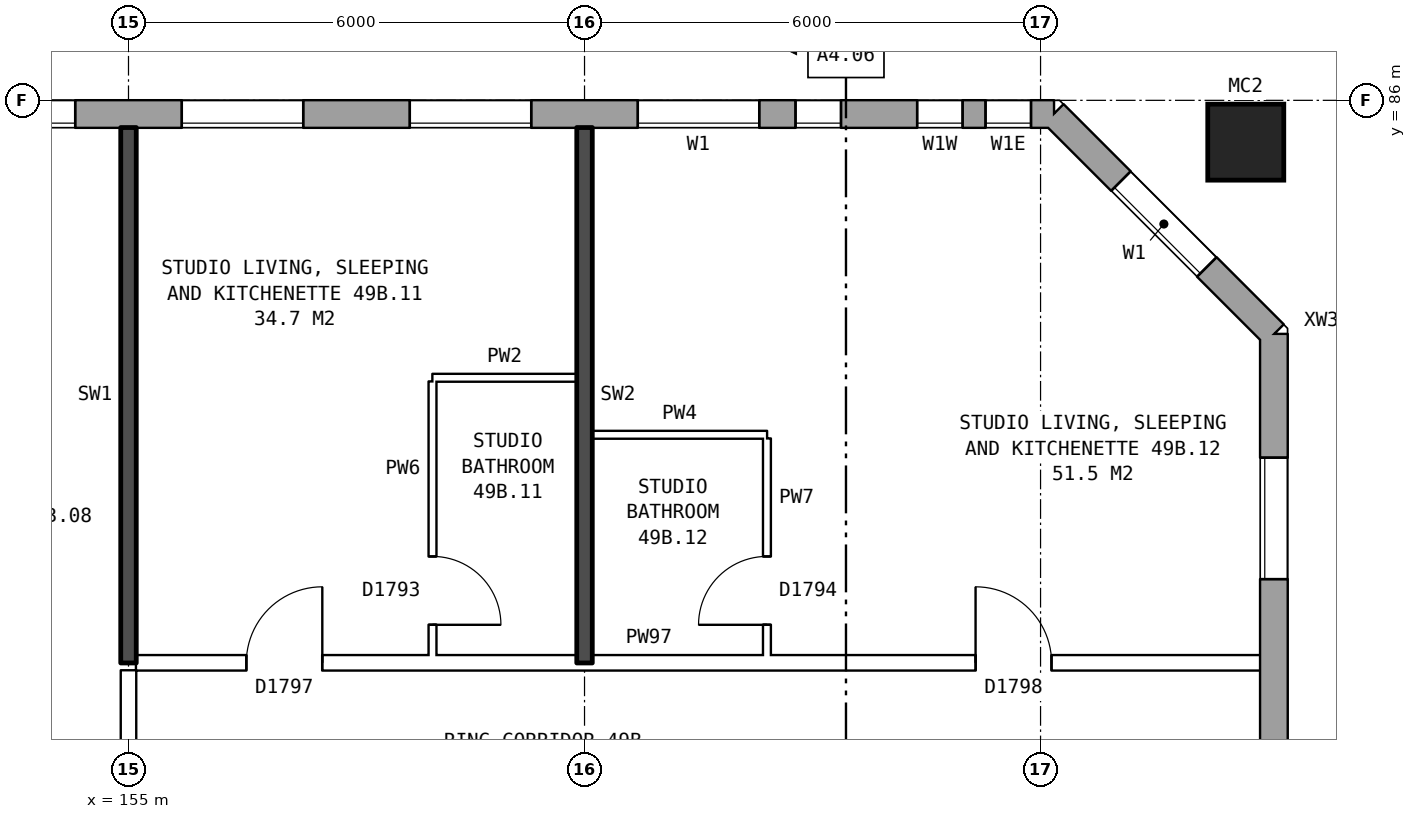
"""IFC4 building model, lengths in metres.
Left out: names, types, materials, properties, quantities, classifications, styles, units other than length and angle.
Written with IfcOpenShell. Run it as: python <this file> out.ifc"""

import sys

from ifc_helpers import new_model, si_unit, direction, frame, frame_2d, origin, origin_2d, place, context, subcontext, project, spatial, rectangle, hollow_rectangle, extrude, element, fill, save


model = new_model("IFC4")
c1 = context("Model", 3, precision=1e-05, world=origin(), true_north=direction((0.0, 1.0)))
c2 = subcontext(c1, "Body", "Model", "MODEL_VIEW")
j1 = project(units=[si_unit("LENGTHUNIT", "METRE"), si_unit("PLANEANGLEUNIT", "RADIAN")], contexts=[c1])
p1 = place(None, origin())
s1 = spatial("IfcSite", under=j1, at=p1, CompositionType="ELEMENT")
p2 = place(p1, origin())
s2 = spatial("IfcBuilding", under=s1, at=p2, CompositionType="ELEMENT")
p3 = place(p2, frame((0.0, 0.0, 175.8)))
s3 = spatial("IfcBuildingStorey", under=s2, at=p3, CompositionType="ELEMENT", Elevation=175.8)
p4 = place(p3, frame((169.7, 85.45, 0.0), z_axis=(0.0, 0.0, 1.0), x_axis=(1.0, 0.0, 0.0)))
e1 = element("IfcColumn", 1, at=p4, inside=s3, PredefinedType="COLUMN", context=c2, shape_type="SweptSolid", body=[
    extrude(hollow_rectangle(XDim=1.0, YDim=1.0, WallThickness=0.055, at=origin_2d()), origin(), (0.0, 0.0, 1.0), 3.1),
])
p5 = place(p3, frame((170.07, 57.075, 0.0), z_axis=(0.0, 0.0, 1.0), x_axis=(0.0, 1.0, 0.0)))
e2 = element("IfcWall", 2, at=p5, inside=s3, PredefinedType="STANDARD", context=c2, shape_type="SweptSolid", body=[
    extrude(rectangle(XDim=25.851, YDim=0.36, at=frame_2d((12.925, 0.0))), origin(), (0.0, 0.0, 1.0), 2.85),
])
p6 = place(p5, frame((1.625, 0.0, 0.8)))
e3 = element("IfcOpeningElement", 3, at=p6, cuts=e2, PredefinedType="OPENING", context=c2, shape_type="SweptSolid", body=[
    extrude(rectangle(XDim=1.6, YDim=1.8, at=frame_2d((0.8, 0.9))), frame((0.0, 0.19, 0.0), z_axis=(0.0, -1.0, 0.0), x_axis=(1.0, 0.0, 0.0)), (0.0, 0.0, 1.0), 0.38),
])
p7 = place(p5, frame((5.725, 0.0, 0.8)))
e4 = element("IfcOpeningElement", 4, at=p7, cuts=e2, PredefinedType="OPENING", context=c2, shape_type="SweptSolid", body=[
    extrude(rectangle(XDim=1.6, YDim=0.9, at=frame_2d((0.8, 0.45))), frame((0.0, 0.19, 0.0), z_axis=(0.0, -1.0, 0.0), x_axis=(1.0, 0.0, 0.0)), (0.0, 0.0, 1.0), 0.38),
])
p8 = place(p5, frame((7.625, 0.0, 0.8)))
e5 = element("IfcOpeningElement", 5, at=p8, cuts=e2, PredefinedType="OPENING", context=c2, shape_type="SweptSolid", body=[
    extrude(rectangle(XDim=1.6, YDim=1.8, at=frame_2d((0.8, 0.9))), frame((0.0, 0.19, 0.0), z_axis=(0.0, -1.0, 0.0), x_axis=(1.0, 0.0, 0.0)), (0.0, 0.0, 1.0), 0.38),
])
p9 = place(p5, frame((10.625, 0.0, 0.8)))
e6 = element("IfcOpeningElement", 6, at=p9, cuts=e2, PredefinedType="OPENING", context=c2, shape_type="SweptSolid", body=[
    extrude(rectangle(XDim=1.6, YDim=1.8, at=frame_2d((0.8, 0.9))), frame((0.0, 0.19, 0.0), z_axis=(0.0, -1.0, 0.0), x_axis=(1.0, 0.0, 0.0)), (0.0, 0.0, 1.0), 0.38),
])
p10 = place(p5, frame((13.625, 0.0, 0.8)))
e7 = element("IfcOpeningElement", 7, at=p10, cuts=e2, PredefinedType="OPENING", context=c2, shape_type="SweptSolid", body=[
    extrude(rectangle(XDim=1.6, YDim=1.8, at=frame_2d((0.8, 0.9))), frame((0.0, 0.19, 0.0), z_axis=(0.0, -1.0, 0.0), x_axis=(1.0, 0.0, 0.0)), (0.0, 0.0, 1.0), 0.38),
])
p11 = place(p5, frame((16.625, 0.0, 0.8)))
e8 = element("IfcOpeningElement", 8, at=p11, cuts=e2, PredefinedType="OPENING", context=c2, shape_type="SweptSolid", body=[
    extrude(rectangle(XDim=1.6, YDim=1.8, at=frame_2d((0.8, 0.9))), frame((0.0, 0.19, 0.0), z_axis=(0.0, -1.0, 0.0), x_axis=(1.0, 0.0, 0.0)), (0.0, 0.0, 1.0), 0.38),
])
p12 = place(p5, frame((9.525, 0.0, 0.8)))
e9 = element("IfcOpeningElement", 9, at=p12, cuts=e2, PredefinedType="OPENING", context=c2, shape_type="SweptSolid", body=[
    extrude(rectangle(XDim=0.8, YDim=1.8, at=frame_2d((0.4, 0.9))), frame((0.0, 0.19, 0.0), z_axis=(0.0, -1.0, 0.0), x_axis=(1.0, 0.0, 0.0)), (0.0, 0.0, 1.0), 0.38),
])
p13 = place(p5, frame((22.625, 0.0, 0.8)))
e10 = element("IfcOpeningElement", 10, at=p13, cuts=e2, PredefinedType="OPENING", context=c2, shape_type="SweptSolid", body=[
    extrude(rectangle(XDim=1.6, YDim=1.8, at=frame_2d((0.8, 0.9))), frame((0.0, 0.19, 0.0), z_axis=(0.0, -1.0, 0.0), x_axis=(1.0, 0.0, 0.0)), (0.0, 0.0, 1.0), 0.38),
])
p14 = place(p5, frame((12.525, 0.0, 0.8)))
e11 = element("IfcOpeningElement", 11, at=p14, cuts=e2, PredefinedType="OPENING", context=c2, shape_type="SweptSolid", body=[
    extrude(rectangle(XDim=0.8, YDim=1.8, at=frame_2d((0.4, 0.9))), frame((0.0, 0.19, 0.0), z_axis=(0.0, -1.0, 0.0), x_axis=(1.0, 0.0, 0.0)), (0.0, 0.0, 1.0), 0.38),
])
p15 = place(p5, frame((15.525, 0.0, 0.8)))
e12 = element("IfcOpeningElement", 12, at=p15, cuts=e2, PredefinedType="OPENING", context=c2, shape_type="SweptSolid", body=[
    extrude(rectangle(XDim=0.8, YDim=1.8, at=frame_2d((0.4, 0.9))), frame((0.0, 0.19, 0.0), z_axis=(0.0, -1.0, 0.0), x_axis=(1.0, 0.0, 0.0)), (0.0, 0.0, 1.0), 0.38),
])
p16 = place(p5, frame((18.525, 0.0, 0.8)))
e13 = element("IfcOpeningElement", 13, at=p16, cuts=e2, PredefinedType="OPENING", context=c2, shape_type="SweptSolid", body=[
    extrude(rectangle(XDim=1.6, YDim=0.9, at=frame_2d((0.8, 0.45))), frame((0.0, 0.19, 0.0), z_axis=(0.0, -1.0, 0.0), x_axis=(1.0, 0.0, 0.0)), (0.0, 0.0, 1.0), 0.38),
])
p17 = place(p3, frame((170.07, 82.925, 0.0), z_axis=(0.0, 0.0, 1.0), x_axis=(-0.707106781187, 0.707106781187, 0.0)))
e14 = element("IfcWall", 14, at=p17, inside=s3, PredefinedType="STANDARD", context=c2, shape_type="SweptSolid", body=[
    extrude(rectangle(XDim=4.094, YDim=0.36, at=frame_2d((2.047, 0.0))), origin(), (0.0, 0.0, 1.0), 2.85),
])
p18 = place(p17, frame((1.247, 0.0, 0.8)))
e15 = element("IfcOpeningElement", 15, at=p18, cuts=e14, PredefinedType="OPENING", context=c2, shape_type="SweptSolid", body=[
    extrude(rectangle(XDim=1.6, YDim=1.8, at=frame_2d((0.8, 0.9))), frame((0.0, 0.19, 0.0), z_axis=(0.0, -1.0, 0.0), x_axis=(1.0, 0.0, 0.0)), (0.0, 0.0, 1.0), 0.38),
])
p19 = place(p3, frame((167.175, 85.82, 0.0), z_axis=(0.0, 0.0, 1.0), x_axis=(-1.0, 0.0, 0.0)))
e16 = element("IfcWall", 16, at=p19, inside=s3, PredefinedType="STANDARD", context=c2, shape_type="SweptSolid", body=[
    extrude(rectangle(XDim=33.101, YDim=0.36, at=frame_2d((16.55, 0.0))), origin(), (0.0, 0.0, 1.0), 2.85),
])
p20 = place(p19, frame((0.3, 0.0, 0.8)))
e17 = element("IfcOpeningElement", 17, at=p20, cuts=e16, PredefinedType="OPENING", context=c2, shape_type="SweptSolid", body=[
    extrude(rectangle(XDim=0.6, YDim=1.8, at=frame_2d((0.3, 0.9))), frame((0.0, 0.19, 0.0), z_axis=(0.0, -1.0, 0.0), x_axis=(1.0, 0.0, 0.0)), (0.0, 0.0, 1.0), 0.38),
])
p21 = place(p19, frame((3.875, 0.0, 0.8)))
e18 = element("IfcOpeningElement", 18, at=p21, cuts=e16, PredefinedType="OPENING", context=c2, shape_type="SweptSolid", body=[
    extrude(rectangle(XDim=1.6, YDim=1.8, at=frame_2d((0.8, 0.9))), frame((0.0, 0.19, 0.0), z_axis=(0.0, -1.0, 0.0), x_axis=(1.0, 0.0, 0.0)), (0.0, 0.0, 1.0), 0.38),
])
p22 = place(p19, frame((6.875, 0.0, 0.8)))
e19 = element("IfcOpeningElement", 19, at=p22, cuts=e16, PredefinedType="OPENING", context=c2, shape_type="SweptSolid", body=[
    extrude(rectangle(XDim=1.6, YDim=1.8, at=frame_2d((0.8, 0.9))), frame((0.0, 0.19, 0.0), z_axis=(0.0, -1.0, 0.0), x_axis=(1.0, 0.0, 0.0)), (0.0, 0.0, 1.0), 0.38),
])
p23 = place(p19, frame((9.875, 0.0, 0.8)))
e20 = element("IfcOpeningElement", 20, at=p23, cuts=e16, PredefinedType="OPENING", context=c2, shape_type="SweptSolid", body=[
    extrude(rectangle(XDim=1.6, YDim=1.8, at=frame_2d((0.8, 0.9))), frame((0.0, 0.19, 0.0), z_axis=(0.0, -1.0, 0.0), x_axis=(1.0, 0.0, 0.0)), (0.0, 0.0, 1.0), 0.38),
])
p24 = place(p19, frame((12.875, 0.0, 0.8)))
e21 = element("IfcOpeningElement", 21, at=p24, cuts=e16, PredefinedType="OPENING", context=c2, shape_type="SweptSolid", body=[
    extrude(rectangle(XDim=1.6, YDim=1.8, at=frame_2d((0.8, 0.9))), frame((0.0, 0.19, 0.0), z_axis=(0.0, -1.0, 0.0), x_axis=(1.0, 0.0, 0.0)), (0.0, 0.0, 1.0), 0.38),
])
p25 = place(p19, frame((15.875, 0.0, 0.8)))
e22 = element("IfcOpeningElement", 22, at=p25, cuts=e16, PredefinedType="OPENING", context=c2, shape_type="SweptSolid", body=[
    extrude(rectangle(XDim=1.6, YDim=1.8, at=frame_2d((0.8, 0.9))), frame((0.0, 0.19, 0.0), z_axis=(0.0, -1.0, 0.0), x_axis=(1.0, 0.0, 0.0)), (0.0, 0.0, 1.0), 0.38),
])
p26 = place(p19, frame((18.875, 0.0, 0.8)))
e23 = element("IfcOpeningElement", 23, at=p26, cuts=e16, PredefinedType="OPENING", context=c2, shape_type="SweptSolid", body=[
    extrude(rectangle(XDim=1.6, YDim=1.8, at=frame_2d((0.8, 0.9))), frame((0.0, 0.19, 0.0), z_axis=(0.0, -1.0, 0.0), x_axis=(1.0, 0.0, 0.0)), (0.0, 0.0, 1.0), 0.38),
])
p27 = place(p19, frame((21.875, 0.0, 0.8)))
e24 = element("IfcOpeningElement", 24, at=p27, cuts=e16, PredefinedType="OPENING", context=c2, shape_type="SweptSolid", body=[
    extrude(rectangle(XDim=1.6, YDim=1.8, at=frame_2d((0.8, 0.9))), frame((0.0, 0.19, 0.0), z_axis=(0.0, -1.0, 0.0), x_axis=(1.0, 0.0, 0.0)), (0.0, 0.0, 1.0), 0.38),
])
p28 = place(p19, frame((24.875, 0.0, 0.8)))
e25 = element("IfcOpeningElement", 25, at=p28, cuts=e16, PredefinedType="OPENING", context=c2, shape_type="SweptSolid", body=[
    extrude(rectangle(XDim=1.6, YDim=1.8, at=frame_2d((0.8, 0.9))), frame((0.0, 0.19, 0.0), z_axis=(0.0, -1.0, 0.0), x_axis=(1.0, 0.0, 0.0)), (0.0, 0.0, 1.0), 0.38),
])
p29 = place(p19, frame((27.875, 0.0, 0.8)))
e26 = element("IfcOpeningElement", 26, at=p29, cuts=e16, PredefinedType="OPENING", context=c2, shape_type="SweptSolid", body=[
    extrude(rectangle(XDim=1.6, YDim=1.8, at=frame_2d((0.8, 0.9))), frame((0.0, 0.19, 0.0), z_axis=(0.0, -1.0, 0.0), x_axis=(1.0, 0.0, 0.0)), (0.0, 0.0, 1.0), 0.38),
])
p30 = place(p19, frame((31.575, 0.0, 1.4)))
e27 = element("IfcOpeningElement", 27, at=p30, cuts=e16, PredefinedType="OPENING", context=c2, shape_type="SweptSolid", body=[
    extrude(rectangle(XDim=1.2, YDim=1.2, at=frame_2d((0.6, 0.6))), frame((0.0, 0.19, 0.0), z_axis=(0.0, -1.0, 0.0), x_axis=(1.0, 0.0, 0.0)), (0.0, 0.0, 1.0), 0.38),
])
p31 = place(p19, frame((1.2, 0.0, 1.7)))
e28 = element("IfcOpeningElement", 28, at=p31, cuts=e16, PredefinedType="OPENING", context=c2, shape_type="SweptSolid", body=[
    extrude(rectangle(XDim=0.6, YDim=0.9, at=frame_2d((0.3, 0.45))), frame((0.0, 0.19, 0.0), z_axis=(0.0, -1.0, 0.0), x_axis=(1.0, 0.0, 0.0)), (0.0, 0.0, 1.0), 0.38),
])
p32 = place(p19, frame((2.8, 0.0, 0.8)))
e29 = element("IfcOpeningElement", 29, at=p32, cuts=e16, PredefinedType="OPENING", context=c2, shape_type="SweptSolid", body=[
    extrude(rectangle(XDim=0.6, YDim=0.9, at=frame_2d((0.3, 0.45))), frame((0.0, 0.19, 0.0), z_axis=(0.0, -1.0, 0.0), x_axis=(1.0, 0.0, 0.0)), (0.0, 0.0, 1.0), 0.38),
])
p33 = place(p3, frame((155.1, 78.6, 0.0), z_axis=(0.0, 0.0, 1.0), x_axis=(1.0, 0.0, 0.0)))
e30 = element("IfcWall", 30, at=p33, inside=s3, PredefinedType="PARTITIONING", context=c2, shape_type="SweptSolid", body=[
    extrude(rectangle(XDim=14.79, YDim=0.2, at=frame_2d((7.395, 0.0))), origin(), (0.0, 0.0, 1.0), 2.85),
])
p34 = place(p33, frame((1.45, 0.0, 0.0)))
e31 = element("IfcOpeningElement", 31, at=p34, cuts=e30, PredefinedType="OPENING", context=c2, shape_type="SweptSolid", body=[
    extrude(rectangle(XDim=1.0, YDim=2.1, at=frame_2d((0.5, 1.05))), frame((0.0, 0.11, 0.0), z_axis=(0.0, -1.0, 0.0), x_axis=(1.0, 0.0, 0.0)), (0.0, 0.0, 1.0), 0.22),
])
p35 = place(p33, frame((11.045, 0.0, 0.0)))
e32 = element("IfcOpeningElement", 32, at=p35, cuts=e30, PredefinedType="OPENING", context=c2, shape_type="SweptSolid", body=[
    extrude(rectangle(XDim=1.0, YDim=2.1, at=frame_2d((0.5, 1.05))), frame((0.0, 0.11, 0.0), z_axis=(0.0, -1.0, 0.0), x_axis=(1.0, 0.0, 0.0)), (0.0, 0.0, 1.0), 0.22),
])
p36 = place(p3, frame((161.1, 81.6, 0.0), z_axis=(0.0, 0.0, 1.0), x_axis=(1.0, 0.0, 0.0)))
e33 = element("IfcWall", 33, at=p36, inside=s3, PredefinedType="PARTITIONING", context=c2, shape_type="SweptSolid", body=[
    extrude(rectangle(XDim=2.3, YDim=0.1, at=frame_2d((1.15, 0.0))), origin(), (0.0, 0.0, 1.0), 2.85),
])
p37 = place(p3, frame((159.0, 82.35, 0.0), z_axis=(0.0, 0.0, 1.0), x_axis=(1.0, 0.0, 0.0)))
e34 = element("IfcWall", 34, at=p37, inside=s3, PredefinedType="PARTITIONING", context=c2, shape_type="SweptSolid", body=[
    extrude(rectangle(XDim=1.9, YDim=0.1, at=frame_2d((0.95, 0.0))), origin(), (0.0, 0.0, 1.0), 2.85),
])
p38 = place(p3, frame((155.0, 76.3, 0.0), z_axis=(0.0, 0.0, 1.0), x_axis=(0.0, 1.0, 0.0)))
e35 = element("IfcWall", 35, at=p38, inside=s3, PredefinedType="PARTITIONING", context=c2, shape_type="SweptSolid", body=[
    extrude(rectangle(XDim=2.2, YDim=0.2, at=frame_2d((1.1, 0.0))), origin(), (0.0, 0.0, 1.0), 2.85),
])
p39 = place(p3, frame((155.0, 78.6, 0.0), z_axis=(0.0, 0.0, 1.0), x_axis=(0.0, 1.0, 0.0)))
e36 = element("IfcWall", 36, at=p39, inside=s3, PredefinedType="SOLIDWALL", context=c2, shape_type="SweptSolid", body=[
    extrude(rectangle(XDim=7.04, YDim=0.2, at=frame_2d((3.52, 0.0))), origin(), (0.0, 0.0, 1.0), 2.85),
])
p40 = place(p3, frame((159.0, 78.7, 0.0), z_axis=(0.0, 0.0, 1.0), x_axis=(0.0, 1.0, 0.0)))
e37 = element("IfcWall", 37, at=p40, inside=s3, PredefinedType="PARTITIONING", context=c2, shape_type="SweptSolid", body=[
    extrude(rectangle(XDim=3.6, YDim=0.1, at=frame_2d((1.8, 0.0))), origin(), (0.0, 0.0, 1.0), 2.85),
])
p41 = place(p40, frame((0.4, 0.0, 0.0)))
e38 = element("IfcOpeningElement", 38, at=p41, cuts=e37, PredefinedType="OPENING", context=c2, shape_type="SweptSolid", body=[
    extrude(rectangle(XDim=0.9, YDim=2.1, at=frame_2d((0.45, 1.05))), frame((0.0, 0.06, 0.0), z_axis=(0.0, -1.0, 0.0), x_axis=(1.0, 0.0, 0.0)), (0.0, 0.0, 1.0), 0.12),
])
p42 = place(p3, frame((161.0, 78.6, 0.0), z_axis=(0.0, 0.0, 1.0), x_axis=(0.0, 1.0, 0.0)))
e39 = element("IfcWall", 39, at=p42, inside=s3, PredefinedType="SOLIDWALL", context=c2, shape_type="SweptSolid", body=[
    extrude(rectangle(XDim=7.04, YDim=0.2, at=frame_2d((3.52, 0.0))), origin(), (0.0, 0.0, 1.0), 2.85),
])
p43 = place(p3, frame((163.4, 78.7, 0.0), z_axis=(0.0, 0.0, 1.0), x_axis=(0.0, 1.0, 0.0)))
e40 = element("IfcWall", 40, at=p43, inside=s3, PredefinedType="PARTITIONING", context=c2, shape_type="SweptSolid", body=[
    extrude(rectangle(XDim=2.85, YDim=0.1, at=frame_2d((1.425, 0.0))), origin(), (0.0, 0.0, 1.0), 2.85),
])
p44 = place(p43, frame((0.4, 0.0, 0.0)))
e41 = element("IfcOpeningElement", 41, at=p44, cuts=e40, PredefinedType="OPENING", context=c2, shape_type="SweptSolid", body=[
    extrude(rectangle(XDim=0.9, YDim=2.1, at=frame_2d((0.45, 1.05))), frame((0.0, 0.06, 0.0), z_axis=(0.0, -1.0, 0.0), x_axis=(1.0, 0.0, 0.0)), (0.0, 0.0, 1.0), 0.12),
])
p45 = place(p13, origin())
e42 = element("IfcWindow", 42, at=p45, inside=s3, PartitioningType="SINGLE_PANEL", PredefinedType="WINDOW", context=c2, shape_type="SweptSolid", body=[
    extrude(rectangle(XDim=1.6, YDim=1.8, at=frame_2d((0.8, 0.9))), frame((0.0, 0.15, 0.0), z_axis=(0.0, -1.0, 0.0), x_axis=(1.0, 0.0, 0.0)), (0.0, 0.0, 1.0), 0.06),
])
fill(e10, e42)
p46 = place(p18, origin())
e43 = element("IfcWindow", 43, at=p46, inside=s3, PartitioningType="SINGLE_PANEL", PredefinedType="WINDOW", context=c2, shape_type="SweptSolid", body=[
    extrude(rectangle(XDim=1.6, YDim=1.8, at=frame_2d((0.8, 0.9))), frame((0.0, 0.15, 0.0), z_axis=(0.0, -1.0, 0.0), x_axis=(1.0, 0.0, 0.0)), (0.0, 0.0, 1.0), 0.06),
])
fill(e15, e43)
p47 = place(p20, origin())
e44 = element("IfcWindow", 44, at=p47, inside=s3, PartitioningType="SINGLE_PANEL", PredefinedType="WINDOW", context=c2, shape_type="SweptSolid", body=[
    extrude(rectangle(XDim=0.6, YDim=1.8, at=frame_2d((0.3, 0.9))), frame((0.0, 0.15, 0.0), z_axis=(0.0, -1.0, 0.0), x_axis=(1.0, 0.0, 0.0)), (0.0, 0.0, 1.0), 0.06),
])
fill(e17, e44)
p48 = place(p21, origin())
e45 = element("IfcWindow", 45, at=p48, inside=s3, PartitioningType="SINGLE_PANEL", PredefinedType="WINDOW", context=c2, shape_type="SweptSolid", body=[
    extrude(rectangle(XDim=1.6, YDim=1.8, at=frame_2d((0.8, 0.9))), frame((0.0, 0.15, 0.0), z_axis=(0.0, -1.0, 0.0), x_axis=(1.0, 0.0, 0.0)), (0.0, 0.0, 1.0), 0.06),
])
fill(e18, e45)
p49 = place(p22, origin())
e46 = element("IfcWindow", 46, at=p49, inside=s3, PartitioningType="SINGLE_PANEL", PredefinedType="WINDOW", context=c2, shape_type="SweptSolid", body=[
    extrude(rectangle(XDim=1.6, YDim=1.8, at=frame_2d((0.8, 0.9))), frame((0.0, 0.15, 0.0), z_axis=(0.0, -1.0, 0.0), x_axis=(1.0, 0.0, 0.0)), (0.0, 0.0, 1.0), 0.06),
])
fill(e19, e46)
p50 = place(p23, origin())
e47 = element("IfcWindow", 47, at=p50, inside=s3, PartitioningType="SINGLE_PANEL", PredefinedType="WINDOW", context=c2, shape_type="SweptSolid", body=[
    extrude(rectangle(XDim=1.6, YDim=1.8, at=frame_2d((0.8, 0.9))), frame((0.0, 0.15, 0.0), z_axis=(0.0, -1.0, 0.0), x_axis=(1.0, 0.0, 0.0)), (0.0, 0.0, 1.0), 0.06),
])
fill(e20, e47)
p51 = place(p24, origin())
e48 = element("IfcWindow", 48, at=p51, inside=s3, PartitioningType="SINGLE_PANEL", PredefinedType="WINDOW", context=c2, shape_type="SweptSolid", body=[
    extrude(rectangle(XDim=1.6, YDim=1.8, at=frame_2d((0.8, 0.9))), frame((0.0, 0.15, 0.0), z_axis=(0.0, -1.0, 0.0), x_axis=(1.0, 0.0, 0.0)), (0.0, 0.0, 1.0), 0.06),
])
fill(e21, e48)
p52 = place(p34, origin())
e49 = element("IfcDoor", 49, at=p52, inside=s3, OperationType="SINGLE_SWING_RIGHT", PredefinedType="DOOR", context=c2, shape_type="SweptSolid", body=[
    extrude(rectangle(XDim=1.0, YDim=2.1, at=frame_2d((0.5, 1.05))), frame((0.0, 0.025, 0.0), z_axis=(0.0, -1.0, 0.0), x_axis=(1.0, 0.0, 0.0)), (0.0, 0.0, 1.0), 0.05),
])
fill(e31, e49)
p53 = place(p41, frame((0.9, 0.0, 0.0), z_axis=(0.0, 0.0, 1.0), x_axis=(-1.0, 0.0, 0.0)))
e50 = element("IfcDoor", 50, at=p53, inside=s3, OperationType="SINGLE_SWING_RIGHT", PredefinedType="DOOR", context=c2, shape_type="SweptSolid", body=[
    extrude(rectangle(XDim=0.9, YDim=2.1, at=frame_2d((0.45, 1.05))), frame((0.0, 0.025, 0.0), z_axis=(0.0, -1.0, 0.0), x_axis=(1.0, 0.0, 0.0)), (0.0, 0.0, 1.0), 0.05),
])
fill(e38, e50)
p54 = place(p35, origin())
e51 = element("IfcDoor", 51, at=p54, inside=s3, OperationType="SINGLE_SWING_LEFT", PredefinedType="DOOR", context=c2, shape_type="SweptSolid", body=[
    extrude(rectangle(XDim=1.0, YDim=2.1, at=frame_2d((0.5, 1.05))), frame((0.0, 0.025, 0.0), z_axis=(0.0, -1.0, 0.0), x_axis=(1.0, 0.0, 0.0)), (0.0, 0.0, 1.0), 0.05),
])
fill(e32, e51)
p55 = place(p44, origin())
e52 = element("IfcDoor", 52, at=p55, inside=s3, OperationType="SINGLE_SWING_LEFT", PredefinedType="DOOR", context=c2, shape_type="SweptSolid", body=[
    extrude(rectangle(XDim=0.9, YDim=2.1, at=frame_2d((0.45, 1.05))), frame((0.0, 0.025, 0.0), z_axis=(0.0, -1.0, 0.0), x_axis=(1.0, 0.0, 0.0)), (0.0, 0.0, 1.0), 0.05),
])
fill(e41, e52)
p56 = place(p31, origin())
e53 = element("IfcWindow", 53, at=p56, inside=s3, PartitioningType="SINGLE_PANEL", PredefinedType="WINDOW", context=c2, shape_type="SweptSolid", body=[
    extrude(rectangle(XDim=0.6, YDim=0.9, at=frame_2d((0.3, 0.45))), frame((0.0, 0.15, 0.0), z_axis=(0.0, -1.0, 0.0), x_axis=(1.0, 0.0, 0.0)), (0.0, 0.0, 1.0), 0.06),
])
fill(e28, e53)
p57 = place(p32, origin())
e54 = element("IfcWindow", 54, at=p57, inside=s3, PartitioningType="SINGLE_PANEL", PredefinedType="WINDOW", context=c2, shape_type="SweptSolid", body=[
    extrude(rectangle(XDim=0.6, YDim=0.9, at=frame_2d((0.3, 0.45))), frame((0.0, 0.15, 0.0), z_axis=(0.0, -1.0, 0.0), x_axis=(1.0, 0.0, 0.0)), (0.0, 0.0, 1.0), 0.06),
])
fill(e29, e54)
save(model, sys.argv[1])
